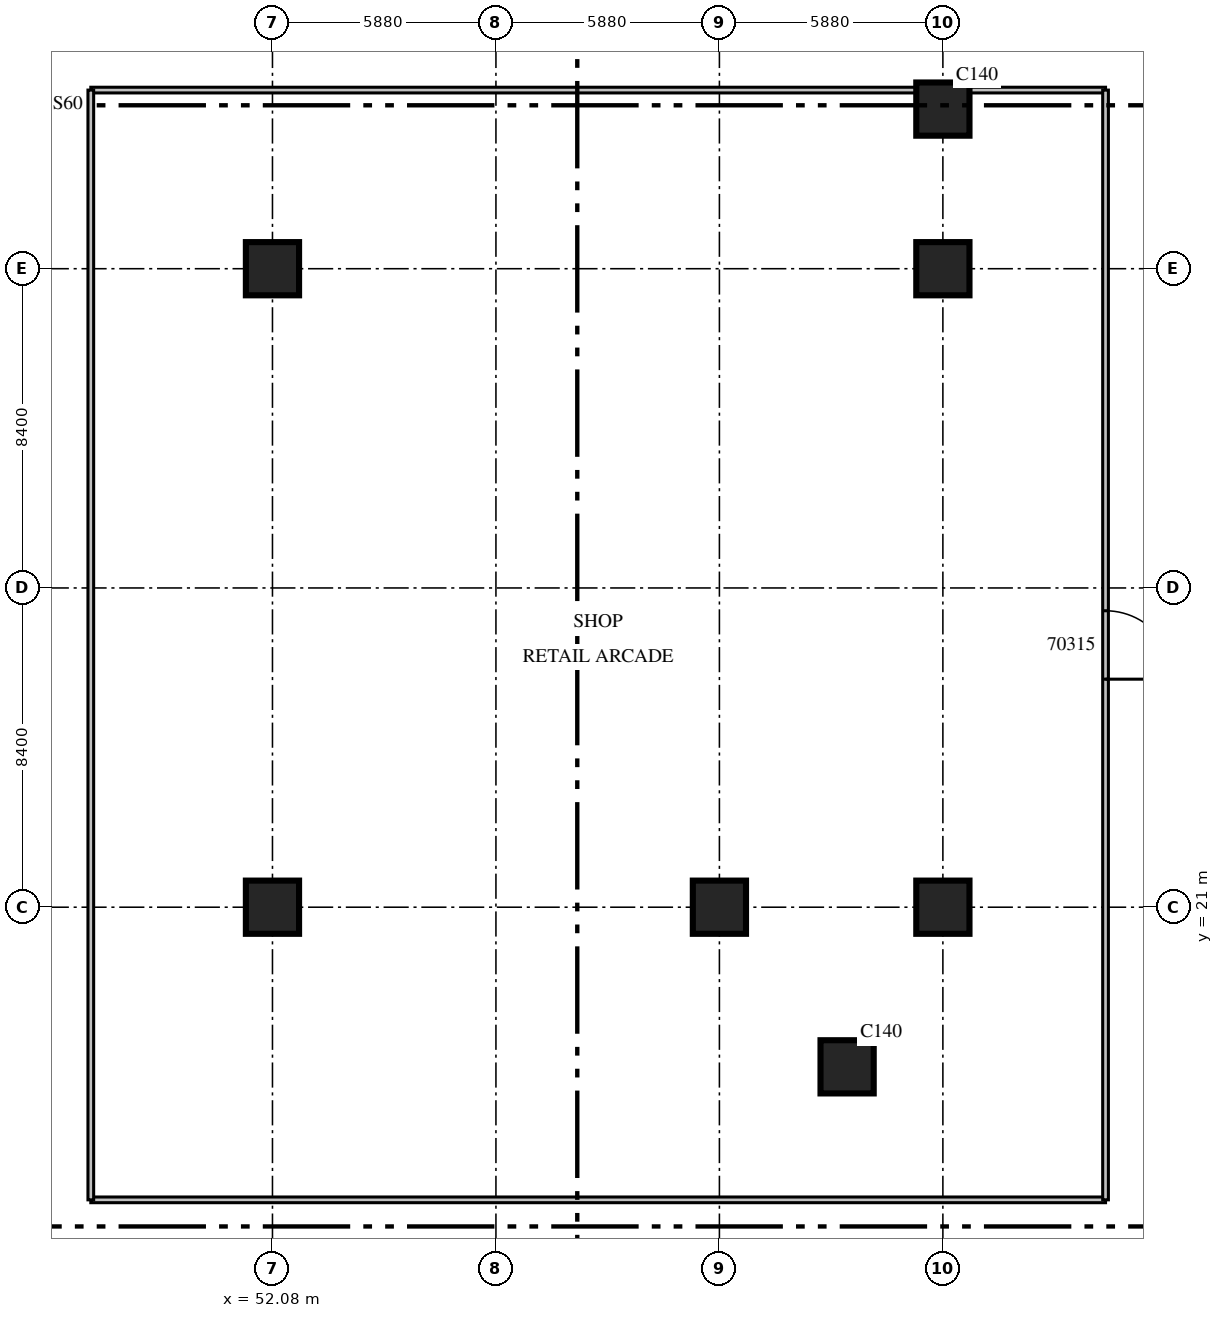
"""IFC4 building model, lengths in metres.
Left out: names, types, materials, properties, quantities, classifications, styles, units other than length and angle.
Written with IfcOpenShell. Run it as: python <this file> out.ifc"""

import sys

from ifc_helpers import new_model, si_unit, direction, frame, frame_2d, origin, origin_2d, place, context, subcontext, project, spatial, rectangle, extrude, source, transform, mapped, element, fill, save


model = new_model("IFC4")
c1 = context("Model", 3, precision=1e-05, world=origin(), true_north=direction((0.0, 1.0)))
c2 = subcontext(c1, "Body", "Model", "MODEL_VIEW")
j1 = project(units=[si_unit("LENGTHUNIT", "METRE"), si_unit("PLANEANGLEUNIT", "RADIAN")], contexts=[c1])
p1 = place(None, origin())
s1 = spatial("IfcSite", under=j1, at=p1, CompositionType="ELEMENT")
p2 = place(p1, origin())
s2 = spatial("IfcBuilding", under=s1, at=p2, CompositionType="ELEMENT")
p3 = place(p2, origin())
s3 = spatial("IfcBuildingStorey", under=s2, at=p3, CompositionType="ELEMENT", Elevation=0.0)
m1 = source(origin(), c2, "Body", "SweptSolid", [
    extrude(rectangle(XDim=1.4, YDim=1.4, at=origin_2d()), origin(), (0.0, 0.0, 1.0), 7.5),
])
for number, where, z_axis, x_axis in (
    (1, (52.08, 21.0, 0.0), (0.0, 0.0, 1.0), (1.0, 0.0, 0.0)),
    (2, (52.08, 37.8, 0.0), (0.0, 0.0, 1.0), (1.0, 0.0, 0.0)),
    (3, (63.84, 21.0, 0.0), (0.0, 0.0, 1.0), (1.0, 0.0, 0.0)),
    (4, (67.2, 16.8, 0.0), (0.0, 0.0, 1.0), (1.0, 0.0, 0.0)),
    (5, (69.72, 21.0, 0.0), (0.0, 0.0, 1.0), (1.0, 0.0, 0.0)),
    (6, (69.72, 37.8, 0.0), (0.0, 0.0, 1.0), (1.0, 0.0, 0.0)),
    (7, (69.72, 42.0, 0.0), (0.0, 0.0, 1.0), (1.0, 0.0, 0.0)),
):
    element("IfcColumn", number, at=place(p3, frame(where, z_axis=z_axis, x_axis=x_axis)), inside=s3, PredefinedType="COLUMN", context=c2, shape_type="MappedRepresentation", body=[
        mapped(m1, transform((0.0, 0.0, 0.0), scale=1.0)),
    ])
p4 = place(p3, frame((47.3, 13.3, 0.0), z_axis=(0.0, 0.0, 1.0), x_axis=(1.0, 0.0, 0.0)))
e8 = element("IfcWall", 8, at=p4, inside=s3, PredefinedType="PARTITIONING", context=c2, shape_type="SweptSolid", body=[
    extrude(rectangle(XDim=26.7, YDim=0.15, at=frame_2d((13.35, 0.0))), origin(), (0.0, 0.0, 1.0), 6.9),
])
m2 = source(origin(), c2, "Body", "SweptSolid", [
    extrude(rectangle(XDim=26.7, YDim=0.15, at=frame_2d((13.35, 0.0))), origin(), (0.0, 0.0, 1.0), 6.9),
])
p5 = place(p3, frame((47.3, 42.5, 0.0), z_axis=(0.0, 0.0, 1.0), x_axis=(1.0, 0.0, 0.0)))
e9 = element("IfcWall", 9, at=p5, inside=s3, PredefinedType="PARTITIONING", context=c2, shape_type="MappedRepresentation", body=[
    mapped(m2, transform((0.0, 0.0, 0.0), scale=1.0)),
])
m3 = source(origin(), c2, "Body", "SweptSolid", [
    extrude(rectangle(XDim=29.2, YDim=0.15, at=frame_2d((14.6, 0.0))), origin(), (0.0, 0.0, 1.0), 6.9),
])
p6 = place(p3, frame((47.3, 13.3, 0.0), z_axis=(0.0, 0.0, 1.0), x_axis=(0.0, 1.0, 0.0)))
e10 = element("IfcWall", 10, at=p6, inside=s3, PredefinedType="PARTITIONING", context=c2, shape_type="MappedRepresentation", body=[
    mapped(m3, transform((0.0, 0.0, 0.0), scale=1.0)),
])
p7 = place(p3, frame((74.0, 13.3, 0.0), z_axis=(0.0, 0.0, 1.0), x_axis=(0.0, 1.0, 0.0)))
e11 = element("IfcWall", 11, at=p7, inside=s3, PredefinedType="PARTITIONING", context=c2, shape_type="MappedRepresentation", body=[
    mapped(m3, transform((0.0, 0.0, 0.0), scale=1.0)),
])
m4 = source(origin(), c2, "Body", "SweptSolid", [
    extrude(rectangle(XDim=1.8, YDim=2.1, at=frame_2d((0.9, 1.05))), frame((0.0, 0.085, 0.0), z_axis=(0.0, -1.0, 0.0), x_axis=(1.0, 0.0, 0.0)), (0.0, 0.0, 1.0), 0.17),
])
p8 = place(p7, frame((13.7, 0.0, 0.0)))
e12 = element("IfcOpeningElement", 12, at=p8, cuts=e11, PredefinedType="OPENING", context=c2, shape_type="MappedRepresentation", body=[
    mapped(m4, transform((0.0, 0.0, 0.0), scale=1.0)),
])
m5 = source(origin(), c2, "Body", "SweptSolid", [
    extrude(rectangle(XDim=1.8, YDim=2.1, at=frame_2d((0.9, 1.05))), frame((0.0, 0.025, 0.0), z_axis=(0.0, -1.0, 0.0), x_axis=(1.0, 0.0, 0.0)), (0.0, 0.0, 1.0), 0.05),
])
p9 = place(p8, origin())
e13 = element("IfcDoor", 13, at=p9, inside=s3, OperationType="DOUBLE_DOOR_SINGLE_SWING", PredefinedType="DOOR", context=c2, shape_type="MappedRepresentation", body=[
    mapped(m5, transform((0.0, 0.0, 0.0), scale=1.0)),
])
fill(e12, e13)
save(model, sys.argv[1])
